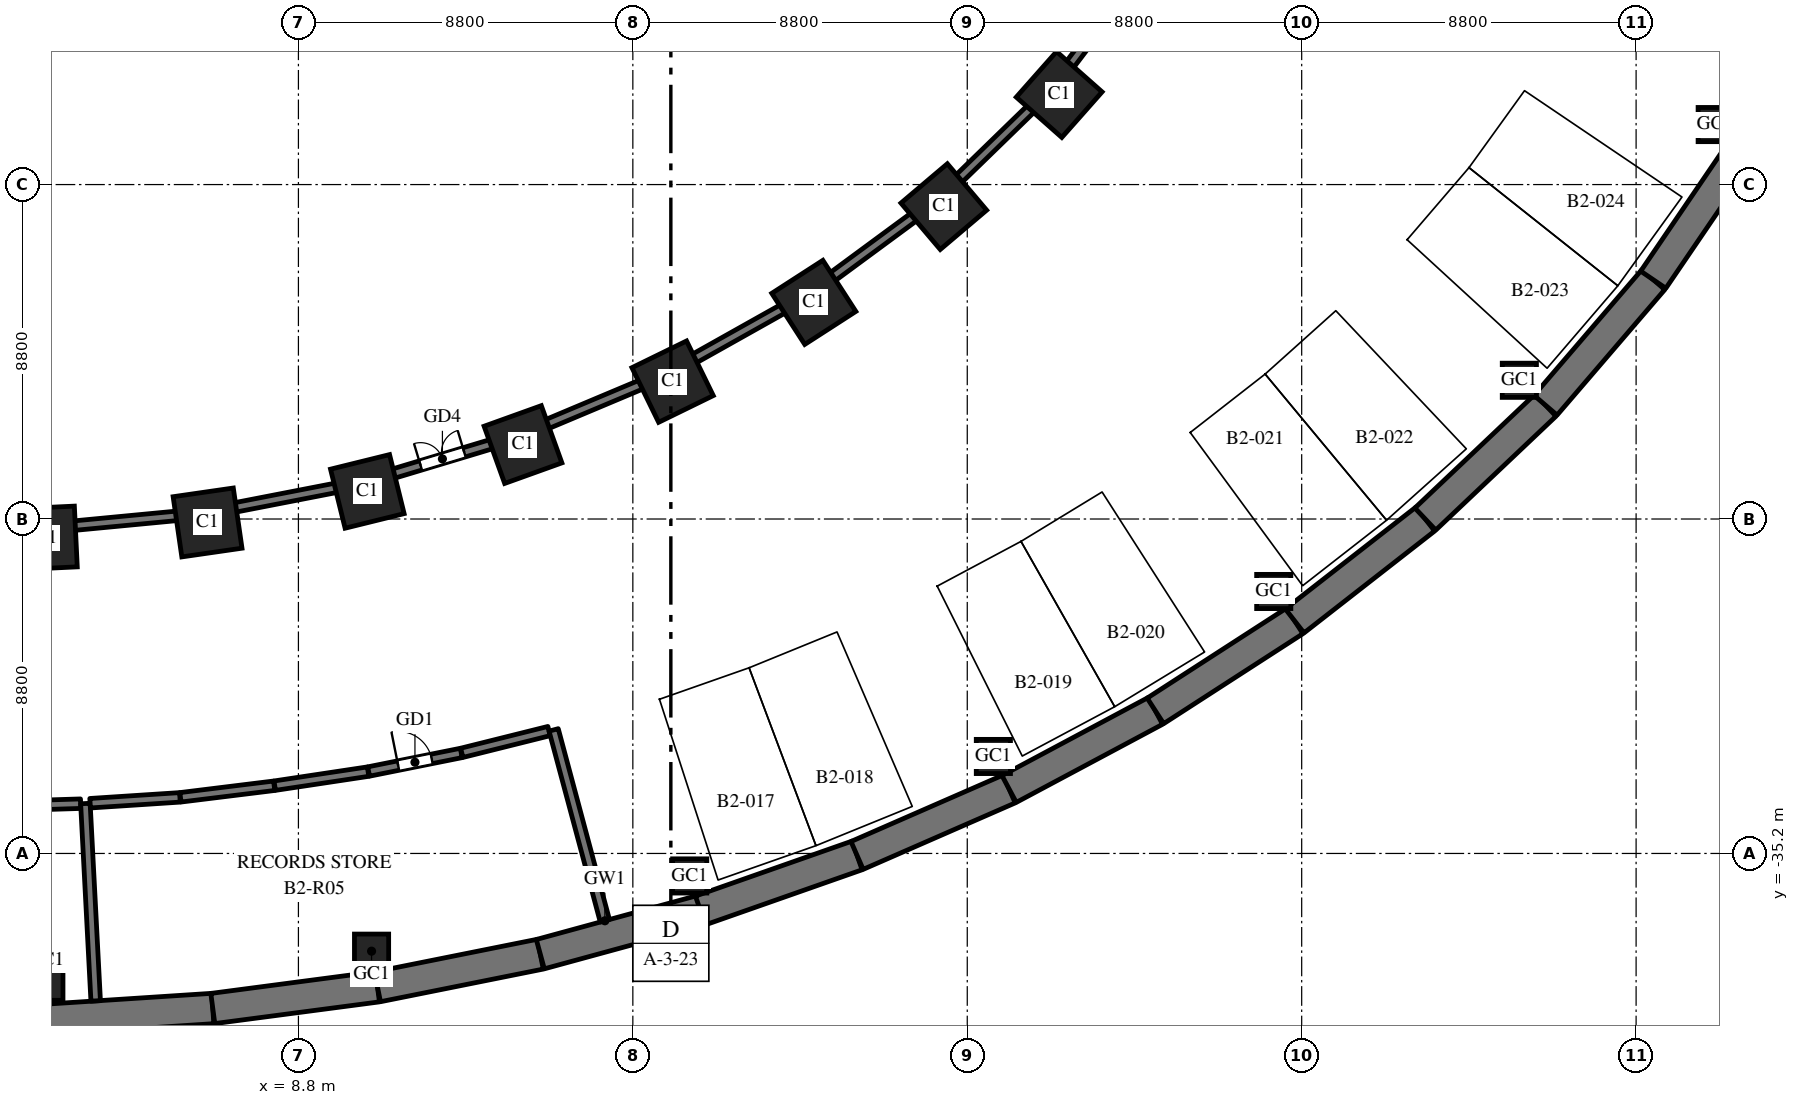
"""IFC4 building model, lengths in metres.
Left out: names, types, materials, properties, quantities, classifications, styles, units other than length and angle.
Written with IfcOpenShell. Run it as: python <this file> out.ifc"""

import sys

from ifc_helpers import new_model, si_unit, direction, frame, frame_2d, origin, origin_2d, place, context, subcontext, project, spatial, rectangle, hollow_rectangle, extrude, element, fill, save


model = new_model("IFC4")
c1 = context("Model", 3, precision=1e-05, world=origin(), true_north=direction((0.0, 1.0)))
c2 = subcontext(c1, "Body", "Model", "MODEL_VIEW")
j1 = project(units=[si_unit("LENGTHUNIT", "METRE"), si_unit("PLANEANGLEUNIT", "RADIAN")], contexts=[c1])
p1 = place(None, origin())
s1 = spatial("IfcSite", under=j1, at=p1, CompositionType="ELEMENT")
p2 = place(p1, origin())
s2 = spatial("IfcBuilding", under=s1, at=p2, CompositionType="ELEMENT")
p3 = place(p2, frame((0.0, 0.0, -8.4)))
s3 = spatial("IfcBuildingStorey", under=s2, at=p3, CompositionType="ELEMENT", Elevation=-8.4)
p4 = place(p3, frame((2.186, -39.564, -0.3), z_axis=(0.0, 0.0, 1.0), x_axis=(0.997876871627, 0.065128711577, 0.0)))
e1 = element("IfcWall", 1, at=p4, inside=s3, PredefinedType="SOLIDWALL", context=c2, shape_type="SweptSolid", body=[
    extrude(rectangle(XDim=4.371, YDim=0.8, at=frame_2d((2.186, 0.0))), origin(), (0.0, 0.0, 1.0), 4.5),
])
p5 = place(p3, frame((6.547, -39.28, -0.3), z_axis=(0.0, 0.0, 1.0), x_axis=(0.991441741932, 0.130549884544, 0.0)))
e2 = element("IfcWall", 2, at=p5, inside=s3, PredefinedType="SOLIDWALL", context=c2, shape_type="SweptSolid", body=[
    extrude(rectangle(XDim=4.37, YDim=0.8, at=frame_2d((2.185, 0.0))), origin(), (0.0, 0.0, 1.0), 4.5),
])
p6 = place(p3, frame((10.88, -38.709, -0.3), z_axis=(0.0, 0.0, 1.0), x_axis=(0.980494629762, 0.196545875071, 0.0)))
e3 = element("IfcWall", 3, at=p6, inside=s3, PredefinedType="SOLIDWALL", context=c2, shape_type="SweptSolid", body=[
    extrude(rectangle(XDim=4.37, YDim=0.8, at=frame_2d((2.185, 0.0))), origin(), (0.0, 0.0, 1.0), 4.5),
])
p7 = place(p3, frame((15.165, -37.85, -0.3), z_axis=(0.0, 0.0, 1.0), x_axis=(0.964679950239, 0.263424739931, 0.0)))
e4 = element("IfcWall", 4, at=p7, inside=s3, PredefinedType="SOLIDWALL", context=c2, shape_type="SweptSolid", body=[
    extrude(rectangle(XDim=4.369, YDim=0.8, at=frame_2d((2.185, 0.0))), origin(), (0.0, 0.0, 1.0), 4.5),
])
p8 = place(p3, frame((19.379, -36.699, -0.3), z_axis=(0.0, 0.0, 1.0), x_axis=(0.943526738033, 0.331296384853, 0.0)))
e5 = element("IfcWall", 5, at=p8, inside=s3, PredefinedType="SOLIDWALL", context=c2, shape_type="SweptSolid", body=[
    extrude(rectangle(XDim=4.368, YDim=0.8, at=frame_2d((2.184, 0.0))), origin(), (0.0, 0.0, 1.0), 4.5),
])
p9 = place(p3, frame((23.5, -35.252, -0.3), z_axis=(0.0, 0.0, 1.0), x_axis=(0.916336904548, 0.400408138483, 0.0)))
e6 = element("IfcWall", 6, at=p9, inside=s3, PredefinedType="SOLIDWALL", context=c2, shape_type="SweptSolid", body=[
    extrude(rectangle(XDim=4.366, YDim=0.8, at=frame_2d((2.183, 0.0))), origin(), (0.0, 0.0, 1.0), 4.5),
])
p10 = place(p3, frame((27.501, -33.504, -0.3), z_axis=(0.0, 0.0, 1.0), x_axis=(0.882159305704, 0.47095112205, 0.0)))
e7 = element("IfcWall", 7, at=p10, inside=s3, PredefinedType="SOLIDWALL", context=c2, shape_type="SweptSolid", body=[
    extrude(rectangle(XDim=4.365, YDim=0.8, at=frame_2d((2.182, 0.0))), origin(), (0.0, 0.0, 1.0), 4.5),
])
p11 = place(p3, frame((31.352, -31.448, -0.3), z_axis=(0.0, 0.0, 1.0), x_axis=(0.840047348843, 0.542513088969, 0.0)))
e8 = element("IfcWall", 8, at=p11, inside=s3, PredefinedType="SOLIDWALL", context=c2, shape_type="SweptSolid", body=[
    extrude(rectangle(XDim=4.362, YDim=0.8, at=frame_2d((2.181, 0.0))), origin(), (0.0, 0.0, 1.0), 4.5),
])
p12 = place(p3, frame((35.016, -29.082, -0.3), z_axis=(0.0, 0.0, 1.0), x_axis=(0.788491985196, 0.615045030288, 0.0)))
e9 = element("IfcWall", 9, at=p12, inside=s3, PredefinedType="SOLIDWALL", context=c2, shape_type="SweptSolid", body=[
    extrude(rectangle(XDim=4.359, YDim=0.8, at=frame_2d((2.18, 0.0))), origin(), (0.0, 0.0, 1.0), 4.5),
])
p13 = place(p3, frame((38.453, -26.401, -0.3), z_axis=(0.0, 0.0, 1.0), x_axis=(0.72620446032, 0.687478786444, 0.0)))
e10 = element("IfcWall", 10, at=p13, inside=s3, PredefinedType="SOLIDWALL", context=c2, shape_type="SweptSolid", body=[
    extrude(rectangle(XDim=4.356, YDim=0.8, at=frame_2d((2.178, 0.0))), origin(), (0.0, 0.0, 1.0), 4.5),
])
p14 = place(p3, frame((41.617, -23.406, -0.3), z_axis=(0.0, 0.0, 1.0), x_axis=(0.651387059497, 0.758745608699, 0.0)))
e11 = element("IfcWall", 11, at=p14, inside=s3, PredefinedType="SOLIDWALL", context=c2, shape_type="SweptSolid", body=[
    extrude(rectangle(XDim=4.353, YDim=0.8, at=frame_2d((2.176, 0.0))), origin(), (0.0, 0.0, 1.0), 4.5),
])
p15 = place(p3, frame((44.452, -20.104, -0.3), z_axis=(0.0, 0.0, 1.0), x_axis=(0.562667738859, 0.82668314102, 0.0)))
e12 = element("IfcWall", 12, at=p15, inside=s3, PredefinedType="SOLIDWALL", context=c2, shape_type="SweptSolid", body=[
    extrude(rectangle(XDim=4.349, YDim=0.8, at=frame_2d((2.174, 0.0))), origin(), (0.0, 0.0, 1.0), 4.5),
])
for number, where, z_axis, x_axis in (
    (13, (2.143, -26.898, -0.3), (0.0, 0.0, 1.0), (0.999, 0.048, 0.0)),
    (14, (6.409, -26.491, -0.3), (0.0, 0.0, 1.0), (0.99, 0.143, 0.0)),
    (15, (10.613, -25.674, -0.3), (0.0, 0.0, 1.0), (0.971, 0.24, 0.0)),
    (16, (14.709, -24.441, -0.3), (0.0, 0.0, 1.0), (0.941, 0.338, 0.0)),
    (17, (18.646, -22.785, -0.3), (0.0, 0.0, 1.0), (0.898, 0.439, 0.0)),
    (18, (22.362, -20.7, -0.3), (0.0, 0.0, 1.0), (0.84, 0.542, 0.0)),
    (19, (25.783, -18.18, -0.3), (0.0, 0.0, 1.0), (0.763, 0.646, 0.0)),
    (20, (28.819, -15.23, -0.3), (0.0, 0.0, 1.0), (0.663, 0.749, 0.0)),
):
    element("IfcColumn", number, at=place(p3, frame(where, z_axis=z_axis, x_axis=x_axis)), inside=s3, PredefinedType="COLUMN", context=c2, shape_type="SweptSolid", body=[
        extrude(rectangle(XDim=1.6, YDim=1.6, at=origin_2d()), origin(), (0.0, 0.0, 1.0), 4.5),
    ])
for number, where, z_axis, x_axis in (
    (21, (2.155, -38.614, -0.3), (0.0, 0.0, 1.0), (1.0, 0.0, 0.0)),
    (22, (10.725, -37.771, -0.3), (0.0, 0.0, 1.0), (1.0, 0.0, 0.0)),
    (23, (19.097, -35.792, -0.3), (0.0, 0.0, 1.0), (1.0, 0.0, 0.0)),
    (24, (27.087, -32.648, -0.3), (0.0, 0.0, 1.0), (1.0, 0.0, 0.0)),
    (25, (34.465, -28.307, -0.3), (0.0, 0.0, 1.0), (1.0, 0.0, 0.0)),
    (26, (40.928, -22.75, -0.3), (0.0, 0.0, 1.0), (1.0, 0.0, 0.0)),
    (27, (46.081, -16.021, -0.3), (0.0, 0.0, 1.0), (1.0, 0.0, 0.0)),
):
    element("IfcColumn", number, at=place(p3, frame(where, z_axis=z_axis, x_axis=x_axis)), inside=s3, PredefinedType="COLUMN", context=c2, shape_type="SweptSolid", body=[
        extrude(hollow_rectangle(XDim=0.9, YDim=0.9, WallThickness=0.045, at=origin_2d()), origin(), (0.0, 0.0, 1.0), 4.5),
    ])
p16 = place(p3, frame((0.704, -33.964, 0.0), z_axis=(0.0, 0.0, 1.0), x_axis=(0.999514588935, 0.031154237368, 0.0)))
e28 = element("IfcWall", 28, at=p16, inside=s3, PredefinedType="SOLIDWALL", context=c2, shape_type="SweptSolid", body=[
    extrude(rectangle(XDim=2.367, YDim=0.25, at=frame_2d((1.183, 0.0))), origin(), (0.0, 0.0, 1.0), 2.9),
])
p17 = place(p3, frame((3.194, -33.886, 0.0), z_axis=(0.0, 0.0, 1.0), x_axis=(0.052068437351, -0.998643518895, 0.0)))
e29 = element("IfcWall", 29, at=p17, inside=s3, PredefinedType="SOLIDWALL", context=c2, shape_type="SweptSolid", body=[
    extrude(rectangle(XDim=5.2, YDim=0.25, at=frame_2d((2.6, 0.0))), origin(), (0.0, 0.0, 1.0), 3.3),
])
p18 = place(p3, frame((3.319, -33.878, 0.0), z_axis=(0.0, 0.0, 1.0), x_axis=(0.997874570946, 0.065163952143, 0.0)))
e30 = element("IfcWall", 30, at=p18, inside=s3, PredefinedType="SOLIDWALL", context=c2, shape_type="SweptSolid", body=[
    extrude(rectangle(XDim=2.368, YDim=0.25, at=frame_2d((1.184, 0.0))), origin(), (0.0, 0.0, 1.0), 3.9),
])
p19 = place(p3, frame((5.696, -33.723, 0.0), z_axis=(0.0, 0.0, 1.0), x_axis=(0.992470098736, 0.122487154901, 0.0)))
e31 = element("IfcWall", 31, at=p19, inside=s3, PredefinedType="SOLIDWALL", context=c2, shape_type="SweptSolid", body=[
    extrude(rectangle(XDim=2.486, YDim=0.25, at=frame_2d((1.243, 0.0))), origin(), (0.0, 0.0, 1.0), 3.9),
])
p20 = place(p3, frame((8.177, -33.417, 0.0), z_axis=(0.0, 0.0, 1.0), x_axis=(0.988860556861, 0.148844882627, 0.0)))
e32 = element("IfcWall", 32, at=p20, inside=s3, PredefinedType="SOLIDWALL", context=c2, shape_type="SweptSolid", body=[
    extrude(rectangle(XDim=2.485, YDim=0.25, at=frame_2d((1.242, 0.0))), origin(), (0.0, 0.0, 1.0), 2.9),
])
p21 = place(p3, frame((10.647, -33.044, 0.0), z_axis=(0.0, 0.0, 1.0), x_axis=(0.980501274237, 0.196512725335, 0.0)))
e33 = element("IfcWall", 33, at=p21, inside=s3, PredefinedType="SOLIDWALL", context=c2, shape_type="SweptSolid", body=[
    extrude(rectangle(XDim=2.486, YDim=0.25, at=frame_2d((1.243, 0.0))), origin(), (0.0, 0.0, 1.0), 3.9),
])
p22 = place(p21, frame((0.793, 0.0, 0.0)))
e34 = element("IfcOpeningElement", 34, at=p22, cuts=e33, PredefinedType="OPENING", context=c2, shape_type="SweptSolid", body=[
    extrude(rectangle(XDim=0.9, YDim=2.1, at=frame_2d((0.45, 1.05))), frame((0.0, 0.135, 0.0), z_axis=(0.0, -1.0, 0.0), x_axis=(1.0, 0.0, 0.0)), (0.0, 0.0, 1.0), 0.27),
])
p23 = place(p3, frame((13.099, -32.552, 0.0), z_axis=(0.0, 0.0, 1.0), x_axis=(0.970251621981, 0.242098719625, 0.0)))
e35 = element("IfcWall", 35, at=p23, inside=s3, PredefinedType="SOLIDWALL", context=c2, shape_type="SweptSolid", body=[
    extrude(rectangle(XDim=2.367, YDim=0.25, at=frame_2d((1.183, 0.0))), origin(), (0.0, 0.0, 1.0), 3.9),
])
p24 = place(p3, frame((15.516, -31.949, 0.0), z_axis=(0.0, 0.0, 1.0), x_axis=(0.259114679201, -0.965846562878, 0.0)))
e36 = element("IfcWall", 36, at=p24, inside=s3, PredefinedType="SOLIDWALL", context=c2, shape_type="SweptSolid", body=[
    extrude(rectangle(XDim=5.2, YDim=0.25, at=frame_2d((2.6, 0.0))), origin(), (0.0, 0.0, 1.0), 3.3),
])
p25 = place(p3, frame((2.14, -26.647, 0.0), z_axis=(0.0, 0.0, 1.0), x_axis=(0.995473208191, 0.09504257874, 0.0)))
e37 = element("IfcWall", 37, at=p25, inside=s3, PredefinedType="SOLIDWALL", context=c2, shape_type="SweptSolid", body=[
    extrude(rectangle(XDim=4.244, YDim=0.25, at=frame_2d((2.122, 0.0))), origin(), (0.0, 0.0, 1.0), 3.0),
])
p26 = place(p3, frame((6.382, -26.241, 0.0), z_axis=(0.0, 0.0, 1.0), x_axis=(0.981622881166, 0.190831127365, 0.0)))
e38 = element("IfcWall", 38, at=p26, inside=s3, PredefinedType="SOLIDWALL", context=c2, shape_type="SweptSolid", body=[
    extrude(rectangle(XDim=4.24, YDim=0.25, at=frame_2d((2.12, 0.0))), origin(), (0.0, 0.0, 1.0), 3.0),
])
p27 = place(p3, frame((10.562, -25.428, 0.0), z_axis=(0.0, 0.0, 1.0), x_axis=(0.957589494621, 0.28813600919, 0.0)))
e39 = element("IfcWall", 39, at=p27, inside=s3, PredefinedType="SOLIDWALL", context=c2, shape_type="SweptSolid", body=[
    extrude(rectangle(XDim=4.234, YDim=0.25, at=frame_2d((2.117, 0.0))), origin(), (0.0, 0.0, 1.0), 3.0),
])
p28 = place(p27, frame((1.517, 0.0, 0.0)))
e40 = element("IfcOpeningElement", 40, at=p28, cuts=e39, PredefinedType="OPENING", context=c2, shape_type="SweptSolid", body=[
    extrude(rectangle(XDim=1.2, YDim=2.1, at=frame_2d((0.6, 1.05))), frame((0.0, 0.135, 0.0), z_axis=(0.0, -1.0, 0.0), x_axis=(1.0, 0.0, 0.0)), (0.0, 0.0, 1.0), 0.27),
])
p29 = place(p3, frame((14.633, -24.202, 0.0), z_axis=(0.0, 0.0, 1.0), x_axis=(0.921810386469, 0.387641085798, 0.0)))
e41 = element("IfcWall", 41, at=p29, inside=s3, PredefinedType="SOLIDWALL", context=c2, shape_type="SweptSolid", body=[
    extrude(rectangle(XDim=4.225, YDim=0.25, at=frame_2d((2.113, 0.0))), origin(), (0.0, 0.0, 1.0), 3.0),
])
p30 = place(p3, frame((18.544, -22.556, 0.0), z_axis=(0.0, 0.0, 1.0), x_axis=(0.872061015455, 0.489397165218, 0.0)))
e42 = element("IfcWall", 42, at=p30, inside=s3, PredefinedType="SOLIDWALL", context=c2, shape_type="SweptSolid", body=[
    extrude(rectangle(XDim=4.213, YDim=0.25, at=frame_2d((2.107, 0.0))), origin(), (0.0, 0.0, 1.0), 3.0),
])
p31 = place(p3, frame((22.233, -20.484, 0.0), z_axis=(0.0, 0.0, 1.0), x_axis=(0.805155221937, 0.593064135306, 0.0)))
e43 = element("IfcWall", 43, at=p31, inside=s3, PredefinedType="SOLIDWALL", context=c2, shape_type="SweptSolid", body=[
    extrude(rectangle(XDim=4.198, YDim=0.25, at=frame_2d((2.099, 0.0))), origin(), (0.0, 0.0, 1.0), 3.0),
])
p32 = place(p3, frame((25.627, -17.983, 0.0), z_axis=(0.0, 0.0, 1.0), x_axis=(0.717227656803, 0.696838925661, 0.0)))
e44 = element("IfcWall", 44, at=p32, inside=s3, PredefinedType="SOLIDWALL", context=c2, shape_type="SweptSolid", body=[
    extrude(rectangle(XDim=4.179, YDim=0.25, at=frame_2d((2.089, 0.0))), origin(), (0.0, 0.0, 1.0), 3.0),
])
p33 = place(p3, frame((28.636, -15.057, 0.0), z_axis=(0.0, 0.0, 1.0), x_axis=(0.604041965907, 0.796952510143, 0.0)))
e45 = element("IfcWall", 45, at=p33, inside=s3, PredefinedType="SOLIDWALL", context=c2, shape_type="SweptSolid", body=[
    extrude(rectangle(XDim=4.157, YDim=0.25, at=frame_2d((2.079, 0.0))), origin(), (0.0, 0.0, 1.0), 3.0),
])
p34 = place(p22, origin())
e46 = element("IfcDoor", 46, at=p34, inside=s3, OperationType="SINGLE_SWING_LEFT", PredefinedType="DOOR", context=c2, shape_type="SweptSolid", body=[
    extrude(rectangle(XDim=0.9, YDim=2.1, at=frame_2d((0.45, 1.05))), frame((0.0, 0.025, 0.0), z_axis=(0.0, -1.0, 0.0), x_axis=(1.0, 0.0, 0.0)), (0.0, 0.0, 1.0), 0.05),
])
fill(e34, e46)
p35 = place(p28, origin())
e47 = element("IfcDoor", 47, at=p35, inside=s3, OperationType="DOUBLE_DOOR_SINGLE_SWING", PredefinedType="DOOR", context=c2, shape_type="SweptSolid", body=[
    extrude(rectangle(XDim=1.2, YDim=2.1, at=frame_2d((0.6, 1.05))), frame((0.0, 0.025, 0.0), z_axis=(0.0, -1.0, 0.0), x_axis=(1.0, 0.0, 0.0)), (0.0, 0.0, 1.0), 0.05),
])
fill(e40, e47)
save(model, sys.argv[1])
